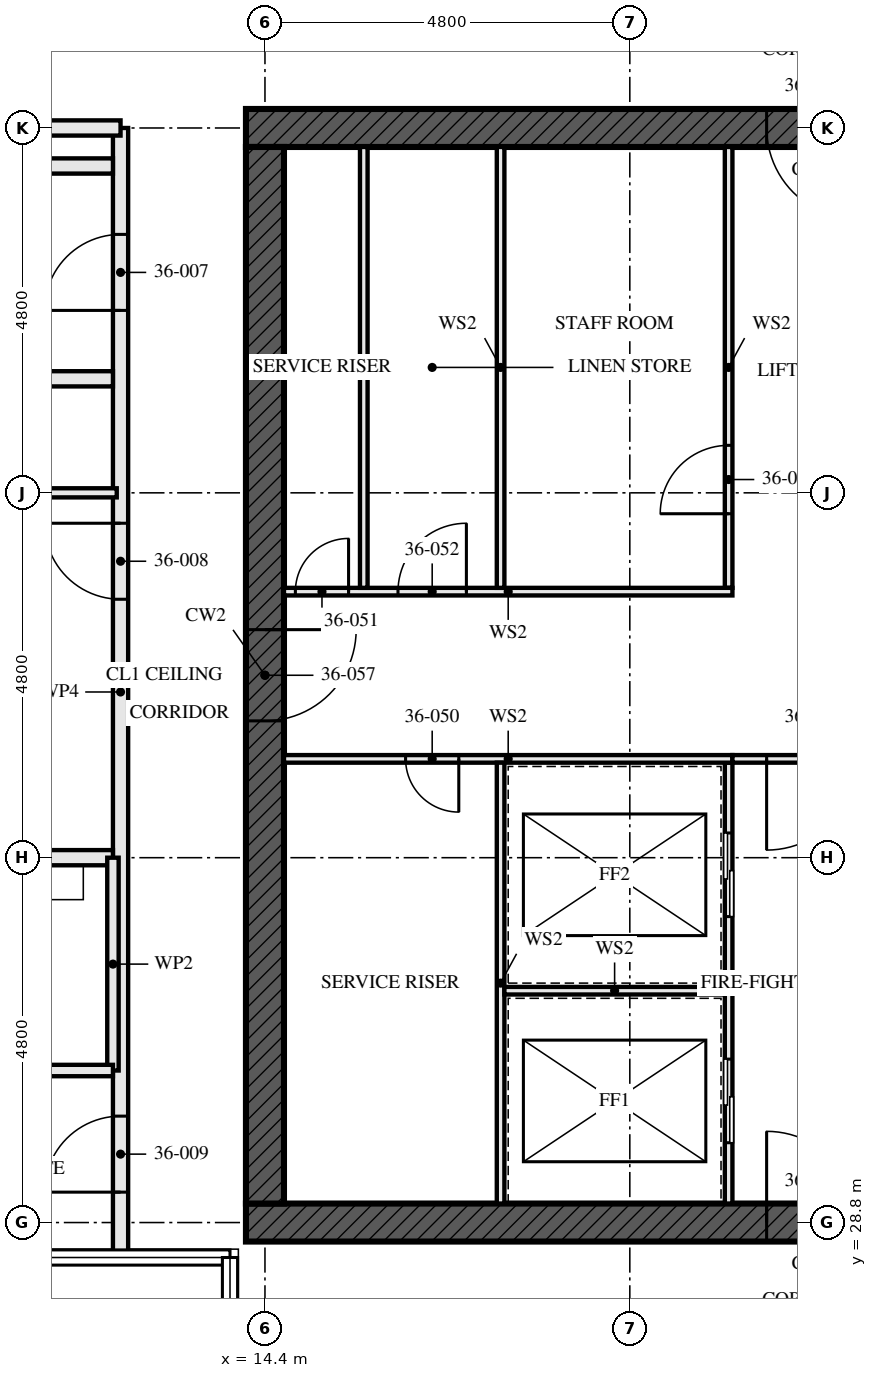
"""IFC4 building model, lengths in metres.
Left out: names, types, materials, properties, quantities, classifications, styles, units other than length and angle.
Written with IfcOpenShell. Run it as: python <this file> out.ifc"""

import sys

from ifc_helpers import new_model, si_unit, direction, frame, frame_2d, origin, place, context, subcontext, project, spatial, rectangle, extrude, element, fill, save


model = new_model("IFC4")
c1 = context("Model", 3, precision=1e-05, world=origin(), true_north=direction((0.0, 1.0)))
c2 = subcontext(c1, "Body", "Model", "MODEL_VIEW")
j1 = project(units=[si_unit("LENGTHUNIT", "METRE"), si_unit("PLANEANGLEUNIT", "RADIAN")], contexts=[c1])
p1 = place(None, origin())
s1 = spatial("IfcSite", under=j1, at=p1, CompositionType="ELEMENT")
p2 = place(p1, origin())
s2 = spatial("IfcBuilding", under=s1, at=p2, CompositionType="ELEMENT")
p3 = place(p2, frame((0.0, 0.0, 133.0)))
s3 = spatial("IfcBuildingStorey", under=s2, at=p3, CompositionType="ELEMENT", Elevation=133.0)
p4 = place(p3, frame((14.15, 28.8, -0.17), z_axis=(0.0, 0.0, 1.0), x_axis=(1.0, 0.0, 0.0)))
e1 = element("IfcWall", 1, at=p4, inside=s3, PredefinedType="SHEAR", context=c2, shape_type="SweptSolid", body=[
    extrude(rectangle(XDim=14.9, YDim=0.5, at=frame_2d((7.45, 0.0))), origin(), (0.0, 0.0, 1.0), 3.42),
])
p5 = place(p4, frame((6.85, 0.0, 0.17)))
e2 = element("IfcOpeningElement", 2, at=p5, cuts=e1, PredefinedType="OPENING", context=c2, shape_type="SweptSolid", body=[
    extrude(rectangle(XDim=1.2, YDim=2.1, at=frame_2d((0.6, 1.05))), frame((0.0, 0.26, 0.0), z_axis=(0.0, -1.0, 0.0), x_axis=(1.0, 0.0, 0.0)), (0.0, 0.0, 1.0), 0.521),
])
p6 = place(p3, frame((29.05, 43.2, -0.17), z_axis=(0.0, 0.0, 1.0), x_axis=(-1.0, 0.0, 0.0)))
e3 = element("IfcWall", 3, at=p6, inside=s3, PredefinedType="SHEAR", context=c2, shape_type="SweptSolid", body=[
    extrude(rectangle(XDim=14.9, YDim=0.5, at=frame_2d((7.45, 0.0))), origin(), (0.0, 0.0, 1.0), 3.42),
])
p7 = place(p6, frame((6.85, 0.0, 0.17)))
e4 = element("IfcOpeningElement", 4, at=p7, cuts=e3, PredefinedType="OPENING", context=c2, shape_type="SweptSolid", body=[
    extrude(rectangle(XDim=1.2, YDim=2.1, at=frame_2d((0.6, 1.05))), frame((0.0, 0.26, 0.0), z_axis=(0.0, -1.0, 0.0), x_axis=(1.0, 0.0, 0.0)), (0.0, 0.0, 1.0), 0.521),
])
p8 = place(p3, frame((14.4, 42.95, -0.17), z_axis=(0.0, 0.0, 1.0), x_axis=(0.0, -1.0, 0.0)))
e5 = element("IfcWall", 5, at=p8, inside=s3, PredefinedType="SHEAR", context=c2, shape_type="SweptSolid", body=[
    extrude(rectangle(XDim=13.9, YDim=0.5, at=frame_2d((6.95, 0.0))), origin(), (0.0, 0.0, 1.0), 3.42),
])
p9 = place(p8, frame((6.35, 0.0, 0.17)))
e6 = element("IfcOpeningElement", 6, at=p9, cuts=e5, PredefinedType="OPENING", context=c2, shape_type="SweptSolid", body=[
    extrude(rectangle(XDim=1.2, YDim=2.1, at=frame_2d((0.6, 1.05))), frame((0.0, 0.26, 0.0), z_axis=(0.0, -1.0, 0.0), x_axis=(1.0, 0.0, 0.0)), (0.0, 0.0, 1.0), 0.521),
])
for number, where, z_axis, x_axis in (
    (7, (7.7, 42.7, 0.0), (0.0, 0.0, 1.0), (1.0, 0.0, 0.0)),
    (8, (7.7, 39.9, 0.0), (0.0, 0.0, 1.0), (1.0, 0.0, 0.0)),
):
    element("IfcWall", number, at=place(p3, frame(where, z_axis=z_axis, x_axis=x_axis)), inside=s3, PredefinedType="SOLIDWALL", context=c2, shape_type="SweptSolid", body=[
        extrude(rectangle(XDim=4.7, YDim=0.2, at=frame_2d((2.35, 0.0))), origin(), (0.0, 0.0, 1.0), 2.94),
    ])
p10 = place(p3, frame((6.2, 38.4, 0.0), z_axis=(0.0, 0.0, 1.0), x_axis=(1.0, 0.0, 0.0)))
e9 = element("IfcWall", 9, at=p10, inside=s3, PredefinedType="PARTITIONING", context=c2, shape_type="SweptSolid", body=[
    extrude(rectangle(XDim=6.25, YDim=0.12, at=frame_2d((3.125, 0.0))), origin(), (0.0, 0.0, 1.0), 2.04),
])
p11 = place(p10, frame((3.9, 0.0, 0.0)))
e10 = element("IfcOpeningElement", 10, at=p11, cuts=e9, PredefinedType="OPENING", context=c2, shape_type="SweptSolid", body=[
    extrude(rectangle(XDim=0.9, YDim=2.0, at=frame_2d((0.45, 1.0))), frame((0.0, 0.071, 0.0), z_axis=(0.0, -1.0, 0.0), x_axis=(1.0, 0.0, 0.0)), (0.0, 0.0, 1.0), 0.141),
])
p12 = place(p3, frame((5.12, 33.6, 0.0), z_axis=(0.0, 0.0, 1.0), x_axis=(1.0, 0.0, 0.0)))
e11 = element("IfcWall", 11, at=p12, inside=s3, PredefinedType="PARTITIONING", context=c2, shape_type="SweptSolid", body=[
    extrude(rectangle(XDim=7.28, YDim=0.2, at=frame_2d((3.64, 0.0))), origin(), (0.0, 0.0, 1.0), 2.24),
])
p13 = place(p3, frame((9.4, 30.8, 0.0), z_axis=(0.0, 0.0, 1.0), x_axis=(1.0, 0.0, 0.0)))
e12 = element("IfcWall", 12, at=p13, inside=s3, PredefinedType="PARTITIONING", context=c2, shape_type="SweptSolid", body=[
    extrude(rectangle(XDim=3.0, YDim=0.15, at=frame_2d((1.5, 0.0))), origin(), (0.0, 0.0, 1.0), 3.25),
])
p14 = place(p3, frame((12.4, 33.6, 0.0), z_axis=(0.0, 0.0, 1.0), x_axis=(0.0, -1.0, 0.0)))
e13 = element("IfcWall", 13, at=p14, inside=s3, PredefinedType="PARTITIONING", context=c2, shape_type="SweptSolid", body=[
    extrude(rectangle(XDim=2.8, YDim=0.15, at=frame_2d((1.4, 0.0))), origin(), (0.0, 0.0, 1.0), 3.25),
])
p15 = place(p3, frame((12.5, 43.2, 0.0), z_axis=(0.0, 0.0, 1.0), x_axis=(0.0, -1.0, 0.0)))
e14 = element("IfcWall", 14, at=p15, inside=s3, PredefinedType="PARTITIONING", context=c2, shape_type="SweptSolid", body=[
    extrude(rectangle(XDim=14.84, YDim=0.2, at=frame_2d((7.42, 0.0))), origin(), (0.0, 0.0, 1.0), 2.04),
])
p16 = place(p15, frame((1.4, 0.0, 0.0)))
e15 = element("IfcOpeningElement", 15, at=p16, cuts=e14, PredefinedType="OPENING", context=c2, shape_type="SweptSolid", body=[
    extrude(rectangle(XDim=1.0, YDim=2.0, at=frame_2d((0.5, 1.0))), frame((0.0, 0.111, 0.0), z_axis=(0.0, -1.0, 0.0), x_axis=(1.0, 0.0, 0.0)), (0.0, 0.0, 1.0), 0.221),
])
p17 = place(p15, frame((5.2, 0.0, 0.0)))
e16 = element("IfcOpeningElement", 16, at=p17, cuts=e14, PredefinedType="OPENING", context=c2, shape_type="SweptSolid", body=[
    extrude(rectangle(XDim=1.0, YDim=2.0, at=frame_2d((0.5, 1.0))), frame((0.0, 0.111, 0.0), z_axis=(0.0, -1.0, 0.0), x_axis=(1.0, 0.0, 0.0)), (0.0, 0.0, 1.0), 0.221),
])
p18 = place(p15, frame((13.0, 0.0, 0.0)))
e17 = element("IfcOpeningElement", 17, at=p18, cuts=e14, PredefinedType="OPENING", context=c2, shape_type="SweptSolid", body=[
    extrude(rectangle(XDim=1.0, YDim=2.0, at=frame_2d((0.5, 1.0))), frame((0.0, 0.111, 0.0), z_axis=(0.0, -1.0, 0.0), x_axis=(1.0, 0.0, 0.0)), (0.0, 0.0, 1.0), 0.221),
])
p19 = place(p3, frame((15.7, 37.15, 0.0), z_axis=(0.0, 0.0, 1.0), x_axis=(0.0, 1.0, 0.0)))
e18 = element("IfcWall", 18, at=p19, inside=s3, PredefinedType="SOLIDWALL", context=c2, shape_type="SweptSolid", body=[
    extrude(rectangle(XDim=5.8, YDim=0.1, at=frame_2d((2.9, 0.0))), origin(), (0.0, 0.0, 1.0), 3.25),
])
p20 = place(p3, frame((20.5, 29.05, 0.0), z_axis=(0.0, 0.0, 1.0), x_axis=(0.0, 1.0, 0.0)))
e19 = element("IfcWall", 19, at=p20, inside=s3, PredefinedType="SOLIDWALL", context=c2, shape_type="SweptSolid", body=[
    extrude(rectangle(XDim=5.8, YDim=0.1, at=frame_2d((2.9, 0.0))), origin(), (0.0, 0.0, 1.0), 3.25),
])
p21 = place(p20, frame((0.8, 0.0, 0.0)))
e20 = element("IfcOpeningElement", 20, at=p21, cuts=e19, PredefinedType="OPENING", context=c2, shape_type="SweptSolid", body=[
    extrude(rectangle(XDim=1.1, YDim=2.3, at=frame_2d((0.55, 1.15))), frame((0.0, 0.061, 0.0), z_axis=(0.0, -1.0, 0.0), x_axis=(1.0, 0.0, 0.0)), (0.0, 0.0, 1.0), 0.121),
])
p22 = place(p20, frame((3.775, 0.0, 0.0)))
e21 = element("IfcOpeningElement", 21, at=p22, cuts=e19, PredefinedType="OPENING", context=c2, shape_type="SweptSolid", body=[
    extrude(rectangle(XDim=1.1, YDim=2.3, at=frame_2d((0.55, 1.15))), frame((0.0, 0.061, 0.0), z_axis=(0.0, -1.0, 0.0), x_axis=(1.0, 0.0, 0.0)), (0.0, 0.0, 1.0), 0.121),
])
p23 = place(p3, frame((20.5, 37.15, 0.0), z_axis=(0.0, 0.0, 1.0), x_axis=(0.0, 1.0, 0.0)))
e22 = element("IfcWall", 22, at=p23, inside=s3, PredefinedType="SOLIDWALL", context=c2, shape_type="SweptSolid", body=[
    extrude(rectangle(XDim=5.8, YDim=0.1, at=frame_2d((2.9, 0.0))), origin(), (0.0, 0.0, 1.0), 3.25),
])
p24 = place(p23, frame((0.975, 0.0, 0.0)))
e23 = element("IfcOpeningElement", 23, at=p24, cuts=e22, PredefinedType="OPENING", context=c2, shape_type="SweptSolid", body=[
    extrude(rectangle(XDim=0.9, YDim=2.1, at=frame_2d((0.45, 1.05))), frame((0.0, 0.061, 0.0), z_axis=(0.0, -1.0, 0.0), x_axis=(1.0, 0.0, 0.0)), (0.0, 0.0, 1.0), 0.121),
])
p25 = place(p3, frame((14.65, 34.9, 0.0), z_axis=(0.0, 0.0, 1.0), x_axis=(1.0, 0.0, 0.0)))
e24 = element("IfcWall", 24, at=p25, inside=s3, PredefinedType="SOLIDWALL", context=c2, shape_type="SweptSolid", body=[
    extrude(rectangle(XDim=5.9, YDim=0.1, at=frame_2d((2.95, 0.0))), origin(), (0.0, 0.0, 1.0), 3.25),
])
p26 = place(p25, frame((1.6, 0.0, 0.0)))
e25 = element("IfcOpeningElement", 25, at=p26, cuts=e24, PredefinedType="OPENING", context=c2, shape_type="SweptSolid", body=[
    extrude(rectangle(XDim=0.7, YDim=2.1, at=frame_2d((0.35, 1.05))), frame((0.0, 0.061, 0.0), z_axis=(0.0, -1.0, 0.0), x_axis=(1.0, 0.0, 0.0)), (0.0, 0.0, 1.0), 0.121),
])
p27 = place(p3, frame((14.65, 37.1, 0.0), z_axis=(0.0, 0.0, 1.0), x_axis=(1.0, 0.0, 0.0)))
e26 = element("IfcWall", 26, at=p27, inside=s3, PredefinedType="SOLIDWALL", context=c2, shape_type="SweptSolid", body=[
    extrude(rectangle(XDim=5.9, YDim=0.1, at=frame_2d((2.95, 0.0))), origin(), (0.0, 0.0, 1.0), 3.25),
])
p28 = place(p27, frame((0.15, 0.0, 0.0)))
e27 = element("IfcOpeningElement", 27, at=p28, cuts=e26, PredefinedType="OPENING", context=c2, shape_type="SweptSolid", body=[
    extrude(rectangle(XDim=0.7, YDim=2.1, at=frame_2d((0.35, 1.05))), frame((0.0, 0.061, 0.0), z_axis=(0.0, -1.0, 0.0), x_axis=(1.0, 0.0, 0.0)), (0.0, 0.0, 1.0), 0.121),
])
p29 = place(p27, frame((1.5, 0.0, 0.0)))
e28 = element("IfcOpeningElement", 28, at=p29, cuts=e26, PredefinedType="OPENING", context=c2, shape_type="SweptSolid", body=[
    extrude(rectangle(XDim=0.9, YDim=2.1, at=frame_2d((0.45, 1.05))), frame((0.0, 0.061, 0.0), z_axis=(0.0, -1.0, 0.0), x_axis=(1.0, 0.0, 0.0)), (0.0, 0.0, 1.0), 0.121),
])
p30 = place(p3, frame((20.55, 34.9, 0.0), z_axis=(0.0, 0.0, 1.0), x_axis=(1.0, 0.0, 0.0)))
e29 = element("IfcWall", 29, at=p30, inside=s3, PredefinedType="SOLIDWALL", context=c2, shape_type="SweptSolid", body=[
    extrude(rectangle(XDim=2.5, YDim=0.1, at=frame_2d((1.25, 0.0))), origin(), (0.0, 0.0, 1.0), 3.25),
])
p31 = place(p30, frame((0.45, 0.0, 0.0)))
e30 = element("IfcOpeningElement", 30, at=p31, cuts=e29, PredefinedType="OPENING", context=c2, shape_type="SweptSolid", body=[
    extrude(rectangle(XDim=1.2, YDim=2.1, at=frame_2d((0.6, 1.05))), frame((0.0, 0.061, 0.0), z_axis=(0.0, -1.0, 0.0), x_axis=(1.0, 0.0, 0.0)), (0.0, 0.0, 1.0), 0.121),
])
p32 = place(p3, frame((17.5, 29.05, 0.0), z_axis=(0.0, 0.0, 1.0), x_axis=(0.0, 1.0, 0.0)))
e31 = element("IfcWall", 31, at=p32, inside=s3, PredefinedType="SOLIDWALL", context=c2, shape_type="SweptSolid", body=[
    extrude(rectangle(XDim=5.8, YDim=0.1, at=frame_2d((2.9, 0.0))), origin(), (0.0, 0.0, 1.0), 3.25),
])
p33 = place(p3, frame((17.55, 31.85, 0.0), z_axis=(0.0, 0.0, 1.0), x_axis=(1.0, 0.0, 0.0)))
e32 = element("IfcWall", 32, at=p33, inside=s3, PredefinedType="SOLIDWALL", context=c2, shape_type="SweptSolid", body=[
    extrude(rectangle(XDim=2.9, YDim=0.1, at=frame_2d((1.45, 0.0))), origin(), (0.0, 0.0, 1.0), 3.25),
])
p34 = place(p3, frame((17.5, 37.15, 0.0), z_axis=(0.0, 0.0, 1.0), x_axis=(0.0, 1.0, 0.0)))
e33 = element("IfcWall", 33, at=p34, inside=s3, PredefinedType="SOLIDWALL", context=c2, shape_type="SweptSolid", body=[
    extrude(rectangle(XDim=5.8, YDim=0.1, at=frame_2d((2.9, 0.0))), origin(), (0.0, 0.0, 1.0), 3.25),
])
p35 = place(p3, frame((12.5, 43.2, 0.0), z_axis=(0.0, 0.0, 1.0), x_axis=(-1.0, 0.0, 0.0)))
e34 = element("IfcWall", 34, at=p35, inside=s3, PredefinedType="PARTITIONING", context=c2, shape_type="SweptSolid", body=[
    extrude(rectangle(XDim=2.555, YDim=0.2, at=frame_2d((1.277, 0.0))), origin(), (0.0, 0.0, 1.0), 2.04),
])
p36 = place(p16, frame((1.0, 0.0, 0.0), z_axis=(0.0, 0.0, 1.0), x_axis=(-1.0, 0.0, 0.0)))
e35 = element("IfcDoor", 35, at=p36, inside=s3, OperationType="SINGLE_SWING_RIGHT", PredefinedType="DOOR", context=c2, shape_type="SweptSolid", body=[
    extrude(rectangle(XDim=1.0, YDim=2.0, at=frame_2d((0.5, 1.0))), frame((0.0, 0.032, 0.0), z_axis=(0.0, -1.0, 0.0), x_axis=(1.0, 0.0, 0.0)), (0.0, 0.0, 1.0), 0.064),
])
fill(e15, e35)
p37 = place(p17, frame((1.0, 0.0, 0.0), z_axis=(0.0, 0.0, 1.0), x_axis=(-1.0, 0.0, 0.0)))
e36 = element("IfcDoor", 36, at=p37, inside=s3, OperationType="SINGLE_SWING_LEFT", PredefinedType="DOOR", context=c2, shape_type="SweptSolid", body=[
    extrude(rectangle(XDim=1.0, YDim=2.0, at=frame_2d((0.5, 1.0))), frame((0.0, 0.027, 0.0), z_axis=(0.0, -1.0, 0.0), x_axis=(1.0, 0.0, 0.0)), (0.0, 0.0, 1.0), 0.054),
])
fill(e16, e36)
p38 = place(p18, frame((1.0, 0.0, 0.0), z_axis=(0.0, 0.0, 1.0), x_axis=(-1.0, 0.0, 0.0)))
e37 = element("IfcDoor", 37, at=p38, inside=s3, OperationType="SINGLE_SWING_RIGHT", PredefinedType="DOOR", context=c2, shape_type="SweptSolid", body=[
    extrude(rectangle(XDim=1.0, YDim=2.0, at=frame_2d((0.5, 1.0))), frame((0.0, 0.027, 0.0), z_axis=(0.0, -1.0, 0.0), x_axis=(1.0, 0.0, 0.0)), (0.0, 0.0, 1.0), 0.054),
])
fill(e17, e37)
p39 = place(p21, origin())
e38 = element("IfcDoor", 38, at=p39, inside=s3, OperationType="SLIDING_TO_LEFT", PredefinedType="DOOR", context=c2, shape_type="SweptSolid", body=[
    extrude(rectangle(XDim=1.1, YDim=2.3, at=frame_2d((0.55, 1.15))), frame((0.0, 0.05, 0.0), z_axis=(0.0, -1.0, 0.0), x_axis=(1.0, 0.0, 0.0)), (0.0, 0.0, 1.0), 0.1),
])
fill(e20, e38)
p40 = place(p22, origin())
e39 = element("IfcDoor", 39, at=p40, inside=s3, OperationType="SLIDING_TO_LEFT", PredefinedType="DOOR", context=c2, shape_type="SweptSolid", body=[
    extrude(rectangle(XDim=1.1, YDim=2.3, at=frame_2d((0.55, 1.15))), frame((0.0, 0.05, 0.0), z_axis=(0.0, -1.0, 0.0), x_axis=(1.0, 0.0, 0.0)), (0.0, 0.0, 1.0), 0.1),
])
fill(e21, e39)
p41 = place(p24, origin())
e40 = element("IfcDoor", 40, at=p41, inside=s3, OperationType="SINGLE_SWING_RIGHT", PredefinedType="DOOR", context=c2, shape_type="SweptSolid", body=[
    extrude(rectangle(XDim=0.9, YDim=2.1, at=frame_2d((0.45, 1.05))), frame((0.0, 0.027, 0.0), z_axis=(0.0, -1.0, 0.0), x_axis=(1.0, 0.0, 0.0)), (0.0, 0.0, 1.0), 0.054),
])
fill(e23, e40)
p42 = place(p26, frame((0.7, 0.0, 0.0), z_axis=(0.0, 0.0, 1.0), x_axis=(-1.0, 0.0, 0.0)))
e41 = element("IfcDoor", 41, at=p42, inside=s3, OperationType="SINGLE_SWING_RIGHT", PredefinedType="DOOR", context=c2, shape_type="SweptSolid", body=[
    extrude(rectangle(XDim=0.7, YDim=2.1, at=frame_2d((0.35, 1.05))), frame((0.0, 0.027, 0.0), z_axis=(0.0, -1.0, 0.0), x_axis=(1.0, 0.0, 0.0)), (0.0, 0.0, 1.0), 0.054),
])
fill(e25, e41)
p43 = place(p28, origin())
e42 = element("IfcDoor", 42, at=p43, inside=s3, OperationType="SINGLE_SWING_LEFT", PredefinedType="DOOR", context=c2, shape_type="SweptSolid", body=[
    extrude(rectangle(XDim=0.7, YDim=2.1, at=frame_2d((0.35, 1.05))), frame((0.0, 0.027, 0.0), z_axis=(0.0, -1.0, 0.0), x_axis=(1.0, 0.0, 0.0)), (0.0, 0.0, 1.0), 0.054),
])
fill(e27, e42)
p44 = place(p29, origin())
e43 = element("IfcDoor", 43, at=p44, inside=s3, OperationType="SINGLE_SWING_LEFT", PredefinedType="DOOR", context=c2, shape_type="SweptSolid", body=[
    extrude(rectangle(XDim=0.9, YDim=2.1, at=frame_2d((0.45, 1.05))), frame((0.0, 0.027, 0.0), z_axis=(0.0, -1.0, 0.0), x_axis=(1.0, 0.0, 0.0)), (0.0, 0.0, 1.0), 0.054),
])
fill(e28, e43)
p45 = place(p31, frame((1.2, 0.0, 0.0), z_axis=(0.0, 0.0, 1.0), x_axis=(-1.0, 0.0, 0.0)))
e44 = element("IfcDoor", 44, at=p45, inside=s3, OperationType="SINGLE_SWING_LEFT", PredefinedType="DOOR", context=c2, shape_type="SweptSolid", body=[
    extrude(rectangle(XDim=1.2, YDim=2.1, at=frame_2d((0.6, 1.05))), frame((0.0, 0.027, 0.0), z_axis=(0.0, -1.0, 0.0), x_axis=(1.0, 0.0, 0.0)), (0.0, 0.0, 1.0), 0.054),
])
fill(e30, e44)
p46 = place(p5, origin())
e45 = element("IfcDoor", 45, at=p46, inside=s3, OperationType="SINGLE_SWING_LEFT", PredefinedType="DOOR", context=c2, shape_type="SweptSolid", body=[
    extrude(rectangle(XDim=1.2, YDim=2.1, at=frame_2d((0.6, 1.05))), frame((0.0, 0.027, 0.0), z_axis=(0.0, -1.0, 0.0), x_axis=(1.0, 0.0, 0.0)), (0.0, 0.0, 1.0), 0.054),
])
fill(e2, e45)
p47 = place(p9, origin())
e46 = element("IfcDoor", 46, at=p47, inside=s3, OperationType="SINGLE_SWING_LEFT", PredefinedType="DOOR", context=c2, shape_type="SweptSolid", body=[
    extrude(rectangle(XDim=1.2, YDim=2.1, at=frame_2d((0.6, 1.05))), frame((0.0, 0.027, 0.0), z_axis=(0.0, -1.0, 0.0), x_axis=(1.0, 0.0, 0.0)), (0.0, 0.0, 1.0), 0.054),
])
fill(e6, e46)
p48 = place(p7, origin())
e47 = element("IfcDoor", 47, at=p48, inside=s3, OperationType="SINGLE_SWING_LEFT", PredefinedType="DOOR", context=c2, shape_type="SweptSolid", body=[
    extrude(rectangle(XDim=1.2, YDim=2.1, at=frame_2d((0.6, 1.05))), frame((0.0, 0.027, 0.0), z_axis=(0.0, -1.0, 0.0), x_axis=(1.0, 0.0, 0.0)), (0.0, 0.0, 1.0), 0.054),
])
fill(e4, e47)
save(model, sys.argv[1])
